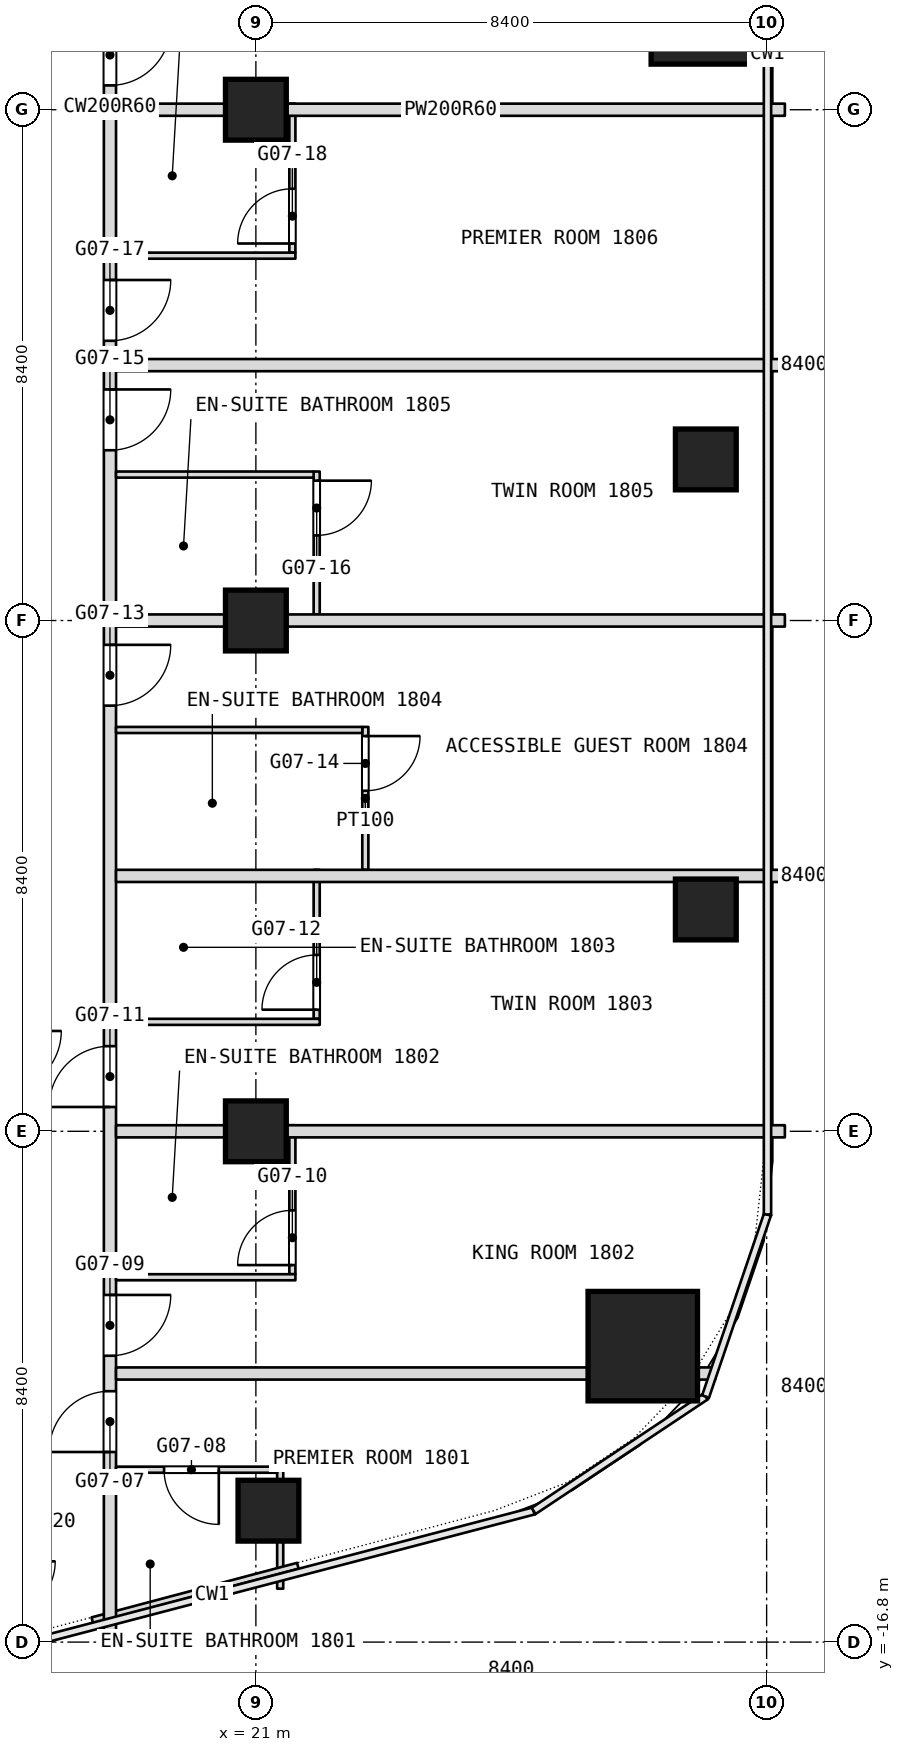
"""IFC4 building model, lengths in metres.
Left out: names, types, materials, properties, quantities, classifications, styles, units other than length and angle.
Written with IfcOpenShell. Run it as: python <this file> out.ifc"""

import sys

from ifc_helpers import new_model, si_unit, direction, frame, frame_2d, origin, origin_2d, place, context, subcontext, project, spatial, rectangle, extrude, element, fill, save


model = new_model("IFC4")
c1 = context("Model", 3, precision=1e-05, world=origin(), true_north=direction((0.0, 1.0)))
c2 = subcontext(c1, "Body", "Model", "MODEL_VIEW")
j1 = project(units=[si_unit("LENGTHUNIT", "METRE"), si_unit("PLANEANGLEUNIT", "RADIAN")], contexts=[c1])
p1 = place(None, origin())
s1 = spatial("IfcSite", under=j1, at=p1, CompositionType="ELEMENT")
p2 = place(p1, origin())
s2 = spatial("IfcBuilding", under=s1, at=p2, CompositionType="ELEMENT")
p3 = place(p2, frame((0.0, 0.0, 79.7)))
s3 = spatial("IfcBuildingStorey", under=s2, at=p3, CompositionType="ELEMENT", Elevation=79.7)
for number, where, z_axis, x_axis in (
    (1, (27.363, -11.933, 0.0), (0.0, 0.0, 1.0), (1.0, 0.0, 0.0)),
    (2, (28.4, 10.05, 0.0), (0.0, 0.0, 1.0), (1.0, 0.0, 0.0)),
):
    element("IfcColumn", number, at=place(p3, frame(where, z_axis=z_axis, x_axis=x_axis)), inside=s3, PredefinedType="COLUMN", context=c2, shape_type="SweptSolid", body=[
        extrude(rectangle(XDim=1.8, YDim=1.8, at=origin_2d()), origin(), (0.0, 0.0, 1.0), 3.6),
    ])
for number, where, z_axis, x_axis in (
    (3, (21.0, -8.4, 0.0), (0.0, 0.0, 1.0), (1.0, 0.0, 0.0)),
    (4, (21.0, 0.0, 0.0), (0.0, 0.0, 1.0), (1.0, 0.0, 0.0)),
    (5, (21.0, 8.4, 0.0), (0.0, 0.0, 1.0), (1.0, 0.0, 0.0)),
    (6, (28.4, 2.649, 0.0), (0.0, 0.0, 1.0), (1.0, 0.0, 0.0)),
    (7, (28.4, -4.752, 0.0), (0.0, 0.0, 1.0), (1.0, 0.0, 0.0)),
    (8, (21.207, -14.639, 0.0), (0.0, 0.0, 1.0), (1.0, 0.0, 0.0)),
):
    element("IfcColumn", number, at=place(p3, frame(where, z_axis=z_axis, x_axis=x_axis)), inside=s3, PredefinedType="COLUMN", context=c2, shape_type="SweptSolid", body=[
        extrude(rectangle(XDim=1.0, YDim=1.0, at=origin_2d()), origin(), (0.0, 0.0, 1.0), 3.6),
    ])
p4 = place(p3, frame((22.8, -4.1, 0.0), z_axis=(0.0, 0.0, 1.0), x_axis=(0.0, 1.0, 0.0)))
e9 = element("IfcWall", 9, at=p4, inside=s3, PredefinedType="PARTITIONING", context=c2, shape_type="SweptSolid", body=[
    extrude(rectangle(XDim=2.35, YDim=0.1, at=frame_2d((1.175, 0.0))), origin(), (0.0, 0.0, 1.0), 3.34),
])
p5 = place(p4, frame((1.3, 0.0, 0.0)))
e10 = element("IfcOpeningElement", 10, at=p5, cuts=e9, PredefinedType="OPENING", context=c2, shape_type="SweptSolid", body=[
    extrude(rectangle(XDim=0.9, YDim=2.1, at=frame_2d((0.45, 1.05))), frame((0.0, 0.05, 0.0), z_axis=(0.0, -1.0, 0.0), x_axis=(1.0, 0.0, 0.0)), (0.0, 0.0, 1.0), 0.1),
])
p6 = place(p3, frame((22.0, -6.55, 0.0), z_axis=(0.0, 0.0, 1.0), x_axis=(0.0, 1.0, 0.0)))
e11 = element("IfcWall", 11, at=p6, inside=s3, PredefinedType="PARTITIONING", context=c2, shape_type="SweptSolid", body=[
    extrude(rectangle(XDim=2.45, YDim=0.1, at=frame_2d((1.225, 0.0))), origin(), (0.0, 0.0, 1.0), 3.34),
])
p7 = place(p6, frame((0.15, 0.0, 0.0)))
e12 = element("IfcOpeningElement", 12, at=p7, cuts=e11, PredefinedType="OPENING", context=c2, shape_type="SweptSolid", body=[
    extrude(rectangle(XDim=0.9, YDim=2.1, at=frame_2d((0.45, 1.05))), frame((0.0, 0.05, 0.0), z_axis=(0.0, -1.0, 0.0), x_axis=(1.0, 0.0, 0.0)), (0.0, 0.0, 1.0), 0.1),
])
p8 = place(p3, frame((22.0, 0.1, 0.0), z_axis=(0.0, 0.0, 1.0), x_axis=(0.0, 1.0, 0.0)))
e13 = element("IfcWall", 13, at=p8, inside=s3, PredefinedType="PARTITIONING", context=c2, shape_type="SweptSolid", body=[
    extrude(rectangle(XDim=2.35, YDim=0.1, at=frame_2d((1.175, 0.0))), origin(), (0.0, 0.0, 1.0), 3.34),
])
p9 = place(p8, frame((1.3, 0.0, 0.0)))
e14 = element("IfcOpeningElement", 14, at=p9, cuts=e13, PredefinedType="OPENING", context=c2, shape_type="SweptSolid", body=[
    extrude(rectangle(XDim=0.9, YDim=2.1, at=frame_2d((0.45, 1.05))), frame((0.0, 0.05, 0.0), z_axis=(0.0, -1.0, 0.0), x_axis=(1.0, 0.0, 0.0)), (0.0, 0.0, 1.0), 0.1),
])
p10 = place(p3, frame((21.6, -10.75, 0.0), z_axis=(0.0, 0.0, 1.0), x_axis=(0.0, 1.0, 0.0)))
e15 = element("IfcWall", 15, at=p10, inside=s3, PredefinedType="PARTITIONING", context=c2, shape_type="SweptSolid", body=[
    extrude(rectangle(XDim=2.45, YDim=0.1, at=frame_2d((1.225, 0.0))), origin(), (0.0, 0.0, 1.0), 3.34),
])
p11 = place(p10, frame((0.15, 0.0, 0.0)))
e16 = element("IfcOpeningElement", 16, at=p11, cuts=e15, PredefinedType="OPENING", context=c2, shape_type="SweptSolid", body=[
    extrude(rectangle(XDim=0.9, YDim=2.1, at=frame_2d((0.45, 1.05))), frame((0.0, 0.05, 0.0), z_axis=(0.0, -1.0, 0.0), x_axis=(1.0, 0.0, 0.0)), (0.0, 0.0, 1.0), 0.1),
])
p12 = place(p3, frame((21.6, 6.05, 0.0), z_axis=(0.0, 0.0, 1.0), x_axis=(0.0, 1.0, 0.0)))
e17 = element("IfcWall", 17, at=p12, inside=s3, PredefinedType="PARTITIONING", context=c2, shape_type="SweptSolid", body=[
    extrude(rectangle(XDim=2.45, YDim=0.1, at=frame_2d((1.225, 0.0))), origin(), (0.0, 0.0, 1.0), 3.34),
])
p13 = place(p12, frame((0.15, 0.0, 0.0)))
e18 = element("IfcOpeningElement", 18, at=p13, cuts=e17, PredefinedType="OPENING", context=c2, shape_type="SweptSolid", body=[
    extrude(rectangle(XDim=0.9, YDim=2.1, at=frame_2d((0.45, 1.05))), frame((0.0, 0.05, 0.0), z_axis=(0.0, -1.0, 0.0), x_axis=(1.0, 0.0, 0.0)), (0.0, 0.0, 1.0), 0.1),
])
p14 = place(p3, frame((21.4, -15.922, 0.0), z_axis=(0.0, 0.0, 1.0), x_axis=(0.0, 1.0, 0.0)))
e19 = element("IfcWall", 19, at=p14, inside=s3, PredefinedType="PARTITIONING", context=c2, shape_type="SweptSolid", body=[
    extrude(rectangle(XDim=2.007, YDim=0.1, at=frame_2d((1.003, 0.0))), origin(), (0.0, 0.0, 1.0), 3.34),
])
p15 = place(p3, frame((18.31, -16.442, 0.0), z_axis=(0.0, 0.0, 1.0), x_axis=(0.966542484633, 0.25650657964, 0.0)))
e20 = element("IfcWall", 20, at=p15, inside=s3, PredefinedType="PARTITIONING", context=c2, shape_type="SweptSolid", body=[
    extrude(rectangle(XDim=3.497, YDim=0.1, at=frame_2d((1.749, 0.0))), origin(), (0.0, 0.0, 1.0), 3.34),
])
p16 = place(p3, frame((18.6, -16.665, 0.0), z_axis=(0.0, 0.0, 1.0), x_axis=(0.0, 1.0, 0.0)))
e21 = element("IfcWall", 21, at=p16, inside=s3, PredefinedType="PARTITIONING", context=c2, shape_type="SweptSolid", body=[
    extrude(rectangle(XDim=50.205, YDim=0.2, at=frame_2d((25.103, 0.0))), origin(), (0.0, 0.0, 1.0), 3.34),
])
p17 = place(p16, frame((2.991, 0.0, 0.0)))
e22 = element("IfcOpeningElement", 22, at=p17, cuts=e21, PredefinedType="OPENING", context=c2, shape_type="SweptSolid", body=[
    extrude(rectangle(XDim=1.0, YDim=2.1, at=frame_2d((0.5, 1.05))), frame((0.0, 0.1, 0.0), z_axis=(0.0, -1.0, 0.0), x_axis=(1.0, 0.0, 0.0)), (0.0, 0.0, 1.0), 0.2),
])
p18 = place(p16, frame((4.574, 0.0, 0.0)))
e23 = element("IfcOpeningElement", 23, at=p18, cuts=e21, PredefinedType="OPENING", context=c2, shape_type="SweptSolid", body=[
    extrude(rectangle(XDim=1.0, YDim=2.1, at=frame_2d((0.5, 1.05))), frame((0.0, 0.1, 0.0), z_axis=(0.0, -1.0, 0.0), x_axis=(1.0, 0.0, 0.0)), (0.0, 0.0, 1.0), 0.2),
])
p19 = place(p16, frame((8.665, 0.0, 0.0)))
e24 = element("IfcOpeningElement", 24, at=p19, cuts=e21, PredefinedType="OPENING", context=c2, shape_type="SweptSolid", body=[
    extrude(rectangle(XDim=1.0, YDim=2.1, at=frame_2d((0.5, 1.05))), frame((0.0, 0.1, 0.0), z_axis=(0.0, -1.0, 0.0), x_axis=(1.0, 0.0, 0.0)), (0.0, 0.0, 1.0), 0.2),
])
p20 = place(p16, frame((15.265, 0.0, 0.0)))
e25 = element("IfcOpeningElement", 25, at=p20, cuts=e21, PredefinedType="OPENING", context=c2, shape_type="SweptSolid", body=[
    extrude(rectangle(XDim=1.0, YDim=2.1, at=frame_2d((0.5, 1.05))), frame((0.0, 0.1, 0.0), z_axis=(0.0, -1.0, 0.0), x_axis=(1.0, 0.0, 0.0)), (0.0, 0.0, 1.0), 0.2),
])
p21 = place(p16, frame((19.465, 0.0, 0.0)))
e26 = element("IfcOpeningElement", 26, at=p21, cuts=e21, PredefinedType="OPENING", context=c2, shape_type="SweptSolid", body=[
    extrude(rectangle(XDim=1.0, YDim=2.1, at=frame_2d((0.5, 1.05))), frame((0.0, 0.1, 0.0), z_axis=(0.0, -1.0, 0.0), x_axis=(1.0, 0.0, 0.0)), (0.0, 0.0, 1.0), 0.2),
])
p22 = place(p16, frame((21.265, 0.0, 0.0)))
e27 = element("IfcOpeningElement", 27, at=p22, cuts=e21, PredefinedType="OPENING", context=c2, shape_type="SweptSolid", body=[
    extrude(rectangle(XDim=1.0, YDim=2.1, at=frame_2d((0.5, 1.05))), frame((0.0, 0.1, 0.0), z_axis=(0.0, -1.0, 0.0), x_axis=(1.0, 0.0, 0.0)), (0.0, 0.0, 1.0), 0.2),
])
p23 = place(p16, frame((25.465, 0.0, 0.0)))
e28 = element("IfcOpeningElement", 28, at=p23, cuts=e21, PredefinedType="OPENING", context=c2, shape_type="SweptSolid", body=[
    extrude(rectangle(XDim=1.0, YDim=2.1, at=frame_2d((0.5, 1.05))), frame((0.0, 0.1, 0.0), z_axis=(0.0, -1.0, 0.0), x_axis=(1.0, 0.0, 0.0)), (0.0, 0.0, 1.0), 0.2),
])
p24 = place(p16, frame((32.065, 0.0, 0.0)))
e29 = element("IfcOpeningElement", 29, at=p24, cuts=e21, PredefinedType="OPENING", context=c2, shape_type="SweptSolid", body=[
    extrude(rectangle(XDim=1.0, YDim=2.1, at=frame_2d((0.5, 1.05))), frame((0.0, 0.1, 0.0), z_axis=(0.0, -1.0, 0.0), x_axis=(1.0, 0.0, 0.0)), (0.0, 0.0, 1.0), 0.2),
])
p25 = place(p16, frame((36.265, 0.0, 0.0)))
e30 = element("IfcOpeningElement", 30, at=p25, cuts=e21, PredefinedType="OPENING", context=c2, shape_type="SweptSolid", body=[
    extrude(rectangle(XDim=1.0, YDim=2.1, at=frame_2d((0.5, 1.05))), frame((0.0, 0.1, 0.0), z_axis=(0.0, -1.0, 0.0), x_axis=(1.0, 0.0, 0.0)), (0.0, 0.0, 1.0), 0.2),
])
p26 = place(p16, frame((38.065, 0.0, 0.0)))
e31 = element("IfcOpeningElement", 31, at=p26, cuts=e21, PredefinedType="OPENING", context=c2, shape_type="SweptSolid", body=[
    extrude(rectangle(XDim=1.0, YDim=2.1, at=frame_2d((0.5, 1.05))), frame((0.0, 0.1, 0.0), z_axis=(0.0, -1.0, 0.0), x_axis=(1.0, 0.0, 0.0)), (0.0, 0.0, 1.0), 0.2),
])
p27 = place(p16, frame((42.265, 0.0, 0.0)))
e32 = element("IfcOpeningElement", 32, at=p27, cuts=e21, PredefinedType="OPENING", context=c2, shape_type="SweptSolid", body=[
    extrude(rectangle(XDim=1.0, YDim=2.1, at=frame_2d((0.5, 1.05))), frame((0.0, 0.1, 0.0), z_axis=(0.0, -1.0, 0.0), x_axis=(1.0, 0.0, 0.0)), (0.0, 0.0, 1.0), 0.2),
])
p28 = place(p16, frame((46.365, 0.0, 0.0)))
e33 = element("IfcOpeningElement", 33, at=p28, cuts=e21, PredefinedType="OPENING", context=c2, shape_type="SweptSolid", body=[
    extrude(rectangle(XDim=1.0, YDim=2.1, at=frame_2d((0.5, 1.05))), frame((0.0, 0.1, 0.0), z_axis=(0.0, -1.0, 0.0), x_axis=(1.0, 0.0, 0.0)), (0.0, 0.0, 1.0), 0.2),
])
p29 = place(p3, frame((18.7, -13.965, 0.0), z_axis=(0.0, 0.0, 1.0), x_axis=(1.0, 0.0, 0.0)))
e34 = element("IfcWall", 34, at=p29, inside=s3, PredefinedType="PARTITIONING", context=c2, shape_type="SweptSolid", body=[
    extrude(rectangle(XDim=2.65, YDim=0.1, at=frame_2d((1.325, 0.0))), origin(), (0.0, 0.0, 1.0), 3.34),
])
p30 = place(p29, frame((0.79, 0.0, 0.0)))
e35 = element("IfcOpeningElement", 35, at=p30, cuts=e34, PredefinedType="OPENING", context=c2, shape_type="SweptSolid", body=[
    extrude(rectangle(XDim=0.9, YDim=2.1, at=frame_2d((0.45, 1.05))), frame((0.0, 0.05, 0.0), z_axis=(0.0, -1.0, 0.0), x_axis=(1.0, 0.0, 0.0)), (0.0, 0.0, 1.0), 0.1),
])
p31 = place(p3, frame((18.7, -12.383, 0.0), z_axis=(0.0, 0.0, 1.0), x_axis=(1.0, 0.0, 0.0)))
e36 = element("IfcWall", 36, at=p31, inside=s3, PredefinedType="PARTITIONING", context=c2, shape_type="SweptSolid", body=[
    extrude(rectangle(XDim=7.763, YDim=0.2, at=frame_2d((3.881, 0.0))), origin(), (0.0, 0.0, 1.0), 3.34),
])
p32 = place(p3, frame((28.263, -12.383, 0.0), z_axis=(0.0, 0.0, 1.0), x_axis=(1.0, 0.0, 0.0)))
e37 = element("IfcWall", 37, at=p32, inside=s3, PredefinedType="PARTITIONING", context=c2, shape_type="SweptSolid", body=[
    extrude(rectangle(XDim=0.29, YDim=0.2, at=frame_2d((0.145, 0.0))), origin(), (0.0, 0.0, 1.0), 3.34),
])
p33 = place(p3, frame((18.7, -10.8, 0.0), z_axis=(0.0, 0.0, 1.0), x_axis=(1.0, 0.0, 0.0)))
e38 = element("IfcWall", 38, at=p33, inside=s3, PredefinedType="PARTITIONING", context=c2, shape_type="SweptSolid", body=[
    extrude(rectangle(XDim=2.95, YDim=0.1, at=frame_2d((1.475, 0.0))), origin(), (0.0, 0.0, 1.0), 3.34),
])
p34 = place(p3, frame((18.7, -8.4, 0.0), z_axis=(0.0, 0.0, 1.0), x_axis=(1.0, 0.0, 0.0)))
e39 = element("IfcWall", 39, at=p34, inside=s3, PredefinedType="PARTITIONING", context=c2, shape_type="SweptSolid", body=[
    extrude(rectangle(XDim=11.0, YDim=0.2, at=frame_2d((5.5, 0.0))), origin(), (0.0, 0.0, 1.0), 2.84),
])
p35 = place(p3, frame((18.7, -6.6, 0.0), z_axis=(0.0, 0.0, 1.0), x_axis=(1.0, 0.0, 0.0)))
e40 = element("IfcWall", 40, at=p35, inside=s3, PredefinedType="PARTITIONING", context=c2, shape_type="SweptSolid", body=[
    extrude(rectangle(XDim=3.35, YDim=0.1, at=frame_2d((1.675, 0.0))), origin(), (0.0, 0.0, 1.0), 3.34),
])
p36 = place(p3, frame((18.7, -4.2, 0.0), z_axis=(0.0, 0.0, 1.0), x_axis=(1.0, 0.0, 0.0)))
e41 = element("IfcWall", 41, at=p36, inside=s3, PredefinedType="PARTITIONING", context=c2, shape_type="SweptSolid", body=[
    extrude(rectangle(XDim=11.0, YDim=0.2, at=frame_2d((5.5, 0.0))), origin(), (0.0, 0.0, 1.0), 3.34),
])
p37 = place(p3, frame((18.7, -1.8, 0.0), z_axis=(0.0, 0.0, 1.0), x_axis=(1.0, 0.0, 0.0)))
e42 = element("IfcWall", 42, at=p37, inside=s3, PredefinedType="PARTITIONING", context=c2, shape_type="SweptSolid", body=[
    extrude(rectangle(XDim=4.05, YDim=0.1, at=frame_2d((2.025, 0.0))), origin(), (0.0, 0.0, 1.0), 3.34),
])
p38 = place(p3, frame((18.7, 0.0, 0.0), z_axis=(0.0, 0.0, 1.0), x_axis=(1.0, 0.0, 0.0)))
e43 = element("IfcWall", 43, at=p38, inside=s3, PredefinedType="PARTITIONING", context=c2, shape_type="SweptSolid", body=[
    extrude(rectangle(XDim=11.0, YDim=0.2, at=frame_2d((5.5, 0.0))), origin(), (0.0, 0.0, 1.0), 2.84),
])
p39 = place(p3, frame((18.7, 2.4, 0.0), z_axis=(0.0, 0.0, 1.0), x_axis=(1.0, 0.0, 0.0)))
e44 = element("IfcWall", 44, at=p39, inside=s3, PredefinedType="PARTITIONING", context=c2, shape_type="SweptSolid", body=[
    extrude(rectangle(XDim=3.25, YDim=0.1, at=frame_2d((1.625, 0.0))), origin(), (0.0, 0.0, 1.0), 3.34),
])
p40 = place(p3, frame((18.7, 4.2, 0.0), z_axis=(0.0, 0.0, 1.0), x_axis=(1.0, 0.0, 0.0)))
e45 = element("IfcWall", 45, at=p40, inside=s3, PredefinedType="PARTITIONING", context=c2, shape_type="SweptSolid", body=[
    extrude(rectangle(XDim=11.0, YDim=0.2, at=frame_2d((5.5, 0.0))), origin(), (0.0, 0.0, 1.0), 3.34),
])
p41 = place(p3, frame((18.7, 6.0, 0.0), z_axis=(0.0, 0.0, 1.0), x_axis=(1.0, 0.0, 0.0)))
e46 = element("IfcWall", 46, at=p41, inside=s3, PredefinedType="PARTITIONING", context=c2, shape_type="SweptSolid", body=[
    extrude(rectangle(XDim=2.95, YDim=0.1, at=frame_2d((1.475, 0.0))), origin(), (0.0, 0.0, 1.0), 3.34),
])
p42 = place(p3, frame((18.7, 8.4, 0.0), z_axis=(0.0, 0.0, 1.0), x_axis=(1.0, 0.0, 0.0)))
e47 = element("IfcWall", 47, at=p42, inside=s3, PredefinedType="PARTITIONING", context=c2, shape_type="SweptSolid", body=[
    extrude(rectangle(XDim=11.0, YDim=0.2, at=frame_2d((5.5, 0.0))), origin(), (0.0, 0.0, 1.0), 2.84),
])
p43 = place(p5, origin())
e48 = element("IfcDoor", 48, at=p43, inside=s3, OperationType="SINGLE_SWING_RIGHT", PredefinedType="DOOR", context=c2, shape_type="SweptSolid", body=[
    extrude(rectangle(XDim=0.9, YDim=2.1, at=frame_2d((0.45, 1.05))), frame((0.0, 0.025, 0.0), z_axis=(0.0, -1.0, 0.0), x_axis=(1.0, 0.0, 0.0)), (0.0, 0.0, 1.0), 0.05),
])
fill(e10, e48)
p44 = place(p7, origin())
e49 = element("IfcDoor", 49, at=p44, inside=s3, OperationType="SINGLE_SWING_LEFT", PredefinedType="DOOR", context=c2, shape_type="SweptSolid", body=[
    extrude(rectangle(XDim=0.9, YDim=2.1, at=frame_2d((0.45, 1.05))), frame((0.0, 0.025, 0.0), z_axis=(0.0, -1.0, 0.0), x_axis=(1.0, 0.0, 0.0)), (0.0, 0.0, 1.0), 0.05),
])
fill(e12, e49)
p45 = place(p9, origin())
e50 = element("IfcDoor", 50, at=p45, inside=s3, OperationType="SINGLE_SWING_RIGHT", PredefinedType="DOOR", context=c2, shape_type="SweptSolid", body=[
    extrude(rectangle(XDim=0.9, YDim=2.1, at=frame_2d((0.45, 1.05))), frame((0.0, 0.025, 0.0), z_axis=(0.0, -1.0, 0.0), x_axis=(1.0, 0.0, 0.0)), (0.0, 0.0, 1.0), 0.05),
])
fill(e14, e50)
p46 = place(p11, origin())
e51 = element("IfcDoor", 51, at=p46, inside=s3, OperationType="SINGLE_SWING_LEFT", PredefinedType="DOOR", context=c2, shape_type="SweptSolid", body=[
    extrude(rectangle(XDim=0.9, YDim=2.1, at=frame_2d((0.45, 1.05))), frame((0.0, 0.025, 0.0), z_axis=(0.0, -1.0, 0.0), x_axis=(1.0, 0.0, 0.0)), (0.0, 0.0, 1.0), 0.05),
])
fill(e16, e51)
p47 = place(p13, origin())
e52 = element("IfcDoor", 52, at=p47, inside=s3, OperationType="SINGLE_SWING_LEFT", PredefinedType="DOOR", context=c2, shape_type="SweptSolid", body=[
    extrude(rectangle(XDim=0.9, YDim=2.1, at=frame_2d((0.45, 1.05))), frame((0.0, 0.025, 0.0), z_axis=(0.0, -1.0, 0.0), x_axis=(1.0, 0.0, 0.0)), (0.0, 0.0, 1.0), 0.05),
])
fill(e18, e52)
p48 = place(p17, origin())
e53 = element("IfcDoor", 53, at=p48, inside=s3, OperationType="SINGLE_SWING_LEFT", PredefinedType="DOOR", context=c2, shape_type="SweptSolid", body=[
    extrude(rectangle(XDim=1.0, YDim=2.1, at=frame_2d((0.5, 1.05))), frame((0.0, 0.025, 0.0), z_axis=(0.0, -1.0, 0.0), x_axis=(1.0, 0.0, 0.0)), (0.0, 0.0, 1.0), 0.05),
])
fill(e22, e53)
p49 = place(p18, origin())
e54 = element("IfcDoor", 54, at=p49, inside=s3, OperationType="SINGLE_SWING_LEFT", PredefinedType="DOOR", context=c2, shape_type="SweptSolid", body=[
    extrude(rectangle(XDim=1.0, YDim=2.1, at=frame_2d((0.5, 1.05))), frame((0.0, 0.025, 0.0), z_axis=(0.0, -1.0, 0.0), x_axis=(1.0, 0.0, 0.0)), (0.0, 0.0, 1.0), 0.05),
])
fill(e23, e54)
p50 = place(p19, origin())
e55 = element("IfcDoor", 55, at=p50, inside=s3, OperationType="SINGLE_SWING_LEFT", PredefinedType="DOOR", context=c2, shape_type="SweptSolid", body=[
    extrude(rectangle(XDim=1.0, YDim=2.1, at=frame_2d((0.5, 1.05))), frame((0.0, 0.025, 0.0), z_axis=(0.0, -1.0, 0.0), x_axis=(1.0, 0.0, 0.0)), (0.0, 0.0, 1.0), 0.05),
])
fill(e24, e55)
p51 = place(p20, origin())
e56 = element("IfcDoor", 56, at=p51, inside=s3, OperationType="SINGLE_SWING_LEFT", PredefinedType="DOOR", context=c2, shape_type="SweptSolid", body=[
    extrude(rectangle(XDim=1.0, YDim=2.1, at=frame_2d((0.5, 1.05))), frame((0.0, 0.025, 0.0), z_axis=(0.0, -1.0, 0.0), x_axis=(1.0, 0.0, 0.0)), (0.0, 0.0, 1.0), 0.05),
])
fill(e25, e56)
p52 = place(p21, origin())
e57 = element("IfcDoor", 57, at=p52, inside=s3, OperationType="SINGLE_SWING_LEFT", PredefinedType="DOOR", context=c2, shape_type="SweptSolid", body=[
    extrude(rectangle(XDim=1.0, YDim=2.1, at=frame_2d((0.5, 1.05))), frame((0.0, 0.025, 0.0), z_axis=(0.0, -1.0, 0.0), x_axis=(1.0, 0.0, 0.0)), (0.0, 0.0, 1.0), 0.05),
])
fill(e26, e57)
p53 = place(p22, origin())
e58 = element("IfcDoor", 58, at=p53, inside=s3, OperationType="SINGLE_SWING_LEFT", PredefinedType="DOOR", context=c2, shape_type="SweptSolid", body=[
    extrude(rectangle(XDim=1.0, YDim=2.1, at=frame_2d((0.5, 1.05))), frame((0.0, 0.025, 0.0), z_axis=(0.0, -1.0, 0.0), x_axis=(1.0, 0.0, 0.0)), (0.0, 0.0, 1.0), 0.05),
])
fill(e27, e58)
p54 = place(p23, origin())
e59 = element("IfcDoor", 59, at=p54, inside=s3, OperationType="SINGLE_SWING_LEFT", PredefinedType="DOOR", context=c2, shape_type="SweptSolid", body=[
    extrude(rectangle(XDim=1.0, YDim=2.1, at=frame_2d((0.5, 1.05))), frame((0.0, 0.025, 0.0), z_axis=(0.0, -1.0, 0.0), x_axis=(1.0, 0.0, 0.0)), (0.0, 0.0, 1.0), 0.05),
])
fill(e28, e59)
p55 = place(p30, origin())
e60 = element("IfcDoor", 60, at=p55, inside=s3, OperationType="SINGLE_SWING_LEFT", PredefinedType="DOOR", context=c2, shape_type="SweptSolid", body=[
    extrude(rectangle(XDim=0.9, YDim=2.1, at=frame_2d((0.45, 1.05))), frame((0.0, 0.025, 0.0), z_axis=(0.0, -1.0, 0.0), x_axis=(1.0, 0.0, 0.0)), (0.0, 0.0, 1.0), 0.05),
])
fill(e35, e60)
save(model, sys.argv[1])
